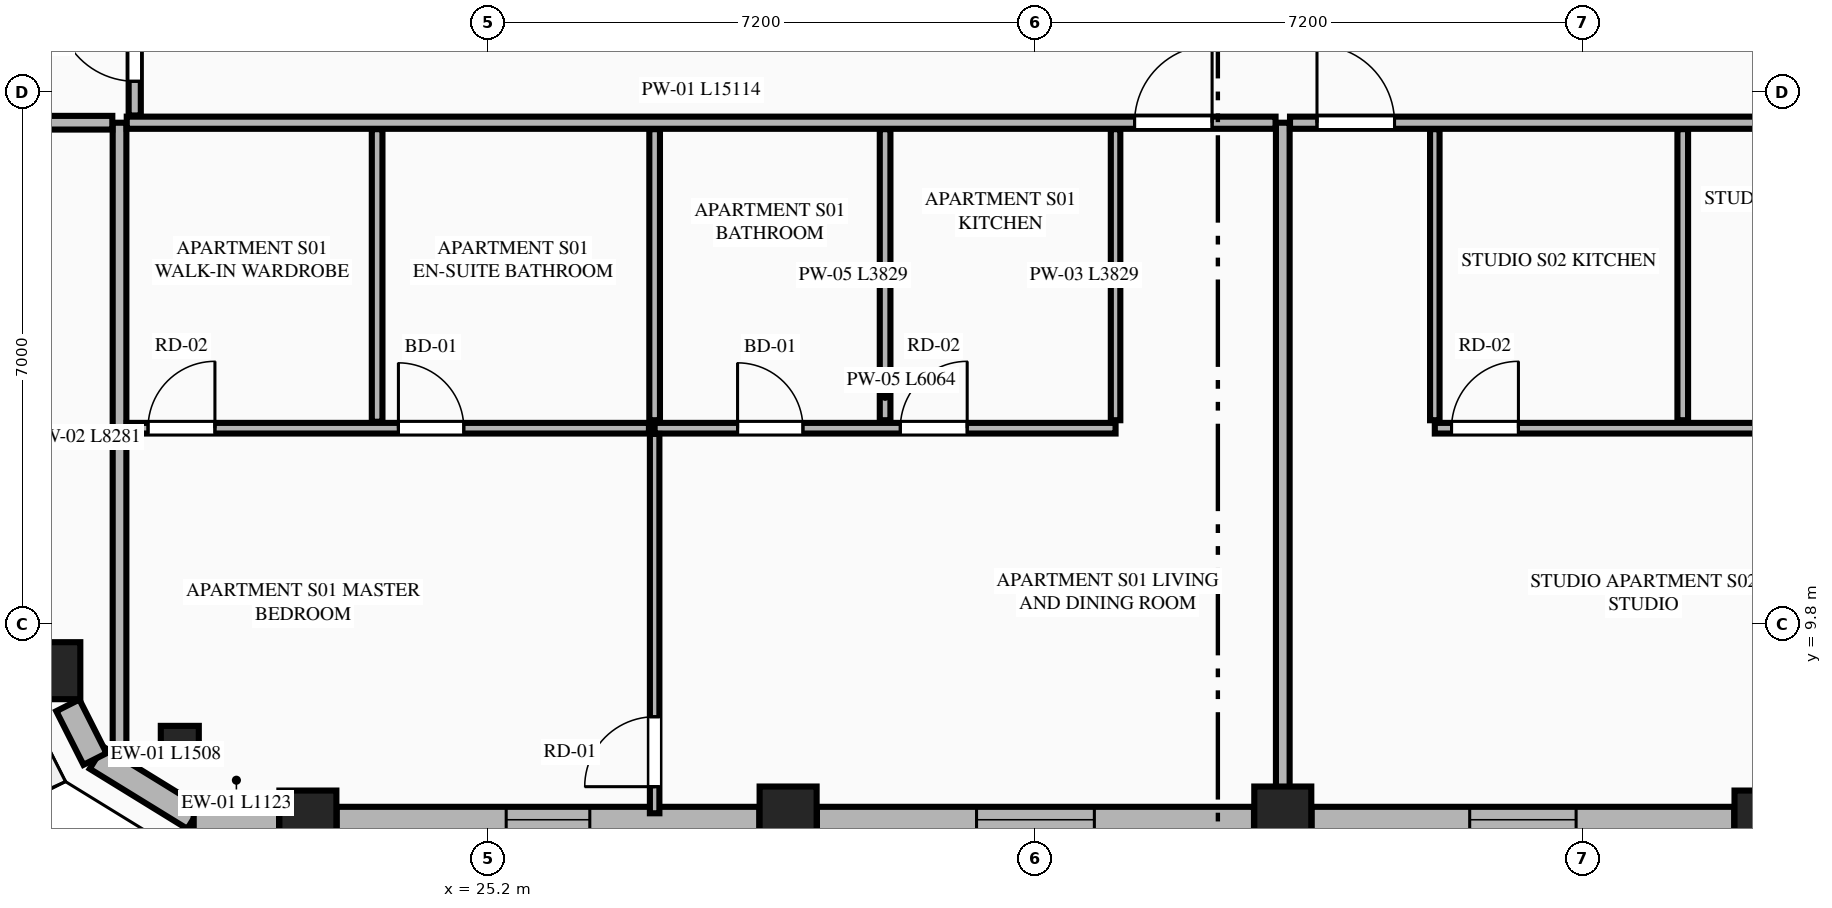
"""IFC4 building model, lengths in metres.
Left out: names, types, materials, properties, quantities, classifications, styles, units other than length and angle.
Written with IfcOpenShell. Run it as: python <this file> out.ifc"""

import sys

from ifc_helpers import new_model, si_unit, direction, frame, frame_2d, origin, origin_2d, place, context, subcontext, project, spatial, rectangle, extrude, element, fill, save


model = new_model("IFC4")
c1 = context("Model", 3, precision=1e-05, world=origin(), true_north=direction((0.0, 1.0)))
c2 = subcontext(c1, "Body", "Model", "MODEL_VIEW")
j1 = project(units=[si_unit("LENGTHUNIT", "METRE"), si_unit("PLANEANGLEUNIT", "RADIAN")], contexts=[c1])
p1 = place(None, origin())
s1 = spatial("IfcSite", under=j1, at=p1, CompositionType="ELEMENT")
p2 = place(p1, origin())
s2 = spatial("IfcBuilding", under=s1, at=p2, CompositionType="ELEMENT")
p3 = place(p2, frame((0.0, 0.0, 256.2)))
s3 = spatial("IfcBuildingStorey", under=s2, at=p3, CompositionType="ELEMENT", Elevation=256.2)
for number, where, z_axis, x_axis in (
    (1, (22.828, 7.239, 0.0), (0.0, 0.0, 1.0), (1.0, 0.0, 0.0)),
    (2, (29.146, 7.292, 0.0), (0.0, 0.0, 1.0), (1.0, 0.0, 0.0)),
    (3, (35.654, 7.292, 0.0), (0.0, 0.0, 1.0), (1.0, 0.0, 0.0)),
    (4, (41.972, 7.239, 0.0), (0.0, 0.0, 1.0), (1.0, 0.0, 0.0)),
    (5, (19.459, 9.191, 0.0), (0.0, 0.0, 1.0), (1.0, 0.0, 0.0)),
):
    element("IfcColumn", number, at=place(p3, frame(where, z_axis=z_axis, x_axis=x_axis)), inside=s3, PredefinedType="COLUMN", context=c2, shape_type="SweptSolid", body=[
        extrude(rectangle(XDim=0.75, YDim=0.75, at=origin_2d()), origin(), (0.0, 0.0, 1.0), 3.65),
    ])
p4 = place(p3, frame((21.143, 8.215, 0.0), z_axis=(0.0, 0.0, 1.0), x_axis=(0.865256437757, -0.501329529272, 0.0)))
e6 = element("IfcColumn", 6, at=p4, inside=s3, PredefinedType="PILASTER", context=c2, shape_type="SweptSolid", body=[
    extrude(rectangle(XDim=0.5, YDim=0.35, at=origin_2d()), origin(), (0.0, 0.0, 1.0), 3.65),
])
p5 = place(p3, frame((20.047, 8.045, 0.0), z_axis=(0.0, 0.0, 1.0), x_axis=(0.851680557619, -0.52406128246, 0.0)))
e7 = element("IfcWall", 7, at=p5, inside=s3, PredefinedType="STANDARD", context=c2, shape_type="SweptSolid", body=[
    extrude(rectangle(XDim=1.508, YDim=0.34, at=frame_2d((0.754, 0.0))), origin(), (0.0, 0.0, 1.0), 3.45),
])
p6 = place(p3, frame((21.326, 7.23, 0.0), z_axis=(0.0, 0.0, 1.0), x_axis=(1.0, 0.0, 0.0)))
e8 = element("IfcWall", 8, at=p6, inside=s3, PredefinedType="STANDARD", context=c2, shape_type="SweptSolid", body=[
    extrude(rectangle(XDim=1.123, YDim=0.34, at=frame_2d((0.562, 0.0))), origin(), (0.0, 0.0, 1.0), 3.45),
])
p7 = place(p3, frame((23.207, 7.23, 0.0), z_axis=(0.0, 0.0, 1.0), x_axis=(1.0, 0.0, 0.0)))
e9 = element("IfcWall", 9, at=p7, inside=s3, PredefinedType="STANDARD", context=c2, shape_type="SweptSolid", body=[
    extrude(rectangle(XDim=5.56, YDim=0.34, at=frame_2d((2.78, 0.0))), origin(), (0.0, 0.0, 1.0), 2.983),
])
p8 = place(p7, frame((2.23, 0.0, 0.75)))
e10 = element("IfcOpeningElement", 10, at=p8, cuts=e9, PredefinedType="OPENING", context=c2, shape_type="SweptSolid", body=[
    extrude(rectangle(XDim=1.1, YDim=2.0, at=frame_2d((0.55, 1.0))), frame((0.0, 0.18, 0.0), z_axis=(0.0, -1.0, 0.0), x_axis=(1.0, 0.0, 0.0)), (0.0, 0.0, 1.0), 0.36),
])
p9 = place(p3, frame((29.525, 7.23, 0.0), z_axis=(0.0, 0.0, 1.0), x_axis=(1.0, 0.0, 0.0)))
e11 = element("IfcWall", 11, at=p9, inside=s3, PredefinedType="STANDARD", context=c2, shape_type="SweptSolid", body=[
    extrude(rectangle(XDim=5.75, YDim=0.34, at=frame_2d((2.875, 0.0))), origin(), (0.0, 0.0, 1.0), 2.983),
])
p10 = place(p9, frame((2.1, 0.0, 0.75)))
e12 = element("IfcOpeningElement", 12, at=p10, cuts=e11, PredefinedType="OPENING", context=c2, shape_type="SweptSolid", body=[
    extrude(rectangle(XDim=1.55, YDim=2.05, at=frame_2d((0.775, 1.025))), frame((0.0, 0.18, 0.0), z_axis=(0.0, -1.0, 0.0), x_axis=(1.0, 0.0, 0.0)), (0.0, 0.0, 1.0), 0.36),
])
p11 = place(p3, frame((36.033, 7.23, 0.0), z_axis=(0.0, 0.0, 1.0), x_axis=(1.0, 0.0, 0.0)))
e13 = element("IfcWall", 13, at=p11, inside=s3, PredefinedType="STANDARD", context=c2, shape_type="SweptSolid", body=[
    extrude(rectangle(XDim=5.56, YDim=0.34, at=frame_2d((2.78, 0.0))), origin(), (0.0, 0.0, 1.0), 2.983),
])
p12 = place(p11, frame((2.08, 0.0, 0.75)))
e14 = element("IfcOpeningElement", 14, at=p12, cuts=e13, PredefinedType="OPENING", context=c2, shape_type="SweptSolid", body=[
    extrude(rectangle(XDim=1.4, YDim=2.05, at=frame_2d((0.7, 1.025))), frame((0.0, 0.18, 0.0), z_axis=(0.0, -1.0, 0.0), x_axis=(1.0, 0.0, 0.0)), (0.0, 0.0, 1.0), 0.36),
])
p13 = place(p3, frame((19.67, 8.735, 0.0), z_axis=(0.0, 0.0, 1.0), x_axis=(0.451404919072, -0.89231922485, 0.0)))
e15 = element("IfcWall", 15, at=p13, inside=s3, PredefinedType="STANDARD", context=c2, shape_type="SweptSolid", body=[
    extrude(rectangle(XDim=0.791, YDim=0.34, at=frame_2d((0.396, 0.0))), origin(), (0.0, 0.0, 1.0), 3.45),
])
p14 = place(p3, frame((20.35, 8.119, 0.0), z_axis=(0.0, 0.0, 1.0), x_axis=(0.0, 1.0, 0.0)))
e16 = element("IfcWall", 16, at=p14, inside=s3, PredefinedType="PARTITIONING", context=c2, shape_type="SweptSolid", body=[
    extrude(rectangle(XDim=8.281, YDim=0.18, at=frame_2d((4.141, 0.0))), origin(), (0.0, 0.0, 1.0), 3.45),
])
p15 = place(p3, frame((35.654, 7.405, 0.0), z_axis=(0.0, 0.0, 1.0), x_axis=(0.0, 1.0, 0.0)))
e17 = element("IfcWall", 17, at=p15, inside=s3, PredefinedType="PARTITIONING", context=c2, shape_type="SweptSolid", body=[
    extrude(rectangle(XDim=8.995, YDim=0.18, at=frame_2d((4.498, 0.0))), origin(), (0.0, 0.0, 1.0), 2.907),
])
p16 = place(p3, frame((20.445, 16.4, 0.0), z_axis=(0.0, 0.0, 1.0), x_axis=(1.0, 0.0, 0.0)))
e18 = element("IfcWall", 18, at=p16, inside=s3, PredefinedType="PARTITIONING", context=c2, shape_type="SweptSolid", body=[
    extrude(rectangle(XDim=15.114, YDim=0.16, at=frame_2d((7.557, 0.0))), origin(), (0.0, 0.0, 1.0), 3.45),
])
p17 = place(p16, frame((13.259, 0.0, 0.0)))
e19 = element("IfcOpeningElement", 19, at=p17, cuts=e18, PredefinedType="OPENING", context=c2, shape_type="SweptSolid", body=[
    extrude(rectangle(XDim=1.02, YDim=2.25, at=frame_2d((0.51, 1.125))), frame((0.0, 0.09, 0.0), z_axis=(0.0, -1.0, 0.0), x_axis=(1.0, 0.0, 0.0)), (0.0, 0.0, 1.0), 0.18),
])
p18 = place(p3, frame((33.454, 12.486, 0.0), z_axis=(0.0, 0.0, 1.0), x_axis=(0.0, 1.0, 0.0)))
e20 = element("IfcWall", 20, at=p18, inside=s3, PredefinedType="PARTITIONING", context=c2, shape_type="SweptSolid", body=[
    extrude(rectangle(XDim=3.829, YDim=0.125, at=frame_2d((1.915, 0.0))), origin(), (0.0, 0.0, 1.0), 3.45),
])
p19 = place(p3, frame((27.39, 12.381, 0.0), z_axis=(0.0, 0.0, 1.0), x_axis=(1.0, 0.0, 0.0)))
e21 = element("IfcWall", 21, at=p19, inside=s3, PredefinedType="PLUMBINGWALL", context=c2, shape_type="SweptSolid", body=[
    extrude(rectangle(XDim=6.064, YDim=0.14, at=frame_2d((3.032, 0.0))), origin(), (0.0, 0.0, 1.0), 3.45),
])
p20 = place(p19, frame((1.091, 0.0, 0.0)))
e22 = element("IfcOpeningElement", 22, at=p20, cuts=e21, PredefinedType="OPENING", context=c2, shape_type="SweptSolid", body=[
    extrude(rectangle(XDim=0.86, YDim=2.1, at=frame_2d((0.43, 1.05))), frame((0.0, 0.08, 0.0), z_axis=(0.0, -1.0, 0.0), x_axis=(1.0, 0.0, 0.0)), (0.0, 0.0, 1.0), 0.16),
])
p21 = place(p19, frame((3.232, 0.0, 0.0)))
e23 = element("IfcOpeningElement", 23, at=p21, cuts=e21, PredefinedType="OPENING", context=c2, shape_type="SweptSolid", body=[
    extrude(rectangle(XDim=0.88, YDim=2.15, at=frame_2d((0.44, 1.075))), frame((0.0, 0.08, 0.0), z_axis=(0.0, -1.0, 0.0), x_axis=(1.0, 0.0, 0.0)), (0.0, 0.0, 1.0), 0.16),
])
p22 = place(p3, frame((20.445, 12.381, 0.0), z_axis=(0.0, 0.0, 1.0), x_axis=(1.0, 0.0, 0.0)))
e24 = element("IfcWall", 24, at=p22, inside=s3, PredefinedType="PLUMBINGWALL", context=c2, shape_type="SweptSolid", body=[
    extrude(rectangle(XDim=6.87, YDim=0.14, at=frame_2d((3.435, 0.0))), origin(), (0.0, 0.0, 1.0), 3.45),
])
p23 = place(p22, frame((0.28, 0.0, 0.0)))
e25 = element("IfcOpeningElement", 25, at=p23, cuts=e24, PredefinedType="OPENING", context=c2, shape_type="SweptSolid", body=[
    extrude(rectangle(XDim=0.88, YDim=2.15, at=frame_2d((0.44, 1.075))), frame((0.0, 0.08, 0.0), z_axis=(0.0, -1.0, 0.0), x_axis=(1.0, 0.0, 0.0)), (0.0, 0.0, 1.0), 0.16),
])
p24 = place(p22, frame((3.574, 0.0, 0.0)))
e26 = element("IfcOpeningElement", 26, at=p24, cuts=e24, PredefinedType="OPENING", context=c2, shape_type="SweptSolid", body=[
    extrude(rectangle(XDim=0.86, YDim=2.1, at=frame_2d((0.43, 1.05))), frame((0.0, 0.08, 0.0), z_axis=(0.0, -1.0, 0.0), x_axis=(1.0, 0.0, 0.0)), (0.0, 0.0, 1.0), 0.16),
])
for number, where, z_axis, x_axis in (
    (27, (30.422, 12.486, 0.0), (0.0, 0.0, 1.0), (0.0, 1.0, 0.0)),
    (28, (27.39, 12.486, 0.0), (0.0, 0.0, 1.0), (0.0, 1.0, 0.0)),
):
    element("IfcWall", number, at=place(p3, frame(where, z_axis=z_axis, x_axis=x_axis)), inside=s3, PredefinedType="PLUMBINGWALL", context=c2, shape_type="SweptSolid", body=[
        extrude(rectangle(XDim=3.829, YDim=0.14, at=frame_2d((1.915, 0.0))), origin(), (0.0, 0.0, 1.0), 3.45),
    ])
p25 = place(p3, frame((27.39, 7.315, 0.0), z_axis=(0.0, 0.0, 1.0), x_axis=(0.0, 1.0, 0.0)))
e29 = element("IfcWall", 29, at=p25, inside=s3, PredefinedType="PARTITIONING", context=c2, shape_type="SweptSolid", body=[
    extrude(rectangle(XDim=4.991, YDim=0.125, at=frame_2d((2.496, 0.0))), origin(), (0.0, 0.0, 1.0), 3.45),
])
p26 = place(p25, frame((0.35, 0.0, 0.0)))
e30 = element("IfcOpeningElement", 30, at=p26, cuts=e29, PredefinedType="OPENING", context=c2, shape_type="SweptSolid", body=[
    extrude(rectangle(XDim=0.92, YDim=2.15, at=frame_2d((0.46, 1.075))), frame((0.0, 0.073, 0.0), z_axis=(0.0, -1.0, 0.0), x_axis=(1.0, 0.0, 0.0)), (0.0, 0.0, 1.0), 0.145),
])
p27 = place(p3, frame((23.739, 12.466, 0.0), z_axis=(0.0, 0.0, 1.0), x_axis=(0.0, 1.0, 0.0)))
e31 = element("IfcWall", 31, at=p27, inside=s3, PredefinedType="PLUMBINGWALL", context=c2, shape_type="SweptSolid", body=[
    extrude(rectangle(XDim=3.849, YDim=0.14, at=frame_2d((1.924, 0.0))), origin(), (0.0, 0.0, 1.0), 3.45),
])
p28 = place(p3, frame((35.749, 16.4, 0.0), z_axis=(0.0, 0.0, 1.0), x_axis=(1.0, 0.0, 0.0)))
e32 = element("IfcWall", 32, at=p28, inside=s3, PredefinedType="PARTITIONING", context=c2, shape_type="SweptSolid", body=[
    extrude(rectangle(XDim=8.606, YDim=0.16, at=frame_2d((4.303, 0.0))), origin(), (0.0, 0.0, 1.0), 3.45),
])
p29 = place(p28, frame((0.355, 0.0, 0.0)))
e33 = element("IfcOpeningElement", 33, at=p29, cuts=e32, PredefinedType="OPENING", context=c2, shape_type="SweptSolid", body=[
    extrude(rectangle(XDim=1.02, YDim=2.25, at=frame_2d((0.51, 1.125))), frame((0.0, 0.09, 0.0), z_axis=(0.0, -1.0, 0.0), x_axis=(1.0, 0.0, 0.0)), (0.0, 0.0, 1.0), 0.18),
])
p30 = place(p3, frame((37.654, 12.486, 0.0), z_axis=(0.0, 0.0, 1.0), x_axis=(0.0, 1.0, 0.0)))
e34 = element("IfcWall", 34, at=p30, inside=s3, PredefinedType="PARTITIONING", context=c2, shape_type="SweptSolid", body=[
    extrude(rectangle(XDim=3.829, YDim=0.125, at=frame_2d((1.915, 0.0))), origin(), (0.0, 0.0, 1.0), 3.45),
])
p31 = place(p3, frame((37.654, 12.381, 0.0), z_axis=(0.0, 0.0, 1.0), x_axis=(1.0, 0.0, 0.0)))
e35 = element("IfcWall", 35, at=p31, inside=s3, PredefinedType="PLUMBINGWALL", context=c2, shape_type="SweptSolid", body=[
    extrude(rectangle(XDim=6.701, YDim=0.14, at=frame_2d((3.351, 0.0))), origin(), (0.0, 0.0, 1.0), 3.45),
])
p32 = place(p31, frame((4.556, 0.0, 0.0)))
e36 = element("IfcOpeningElement", 36, at=p32, cuts=e35, PredefinedType="OPENING", context=c2, shape_type="SweptSolid", body=[
    extrude(rectangle(XDim=0.86, YDim=2.1, at=frame_2d((0.43, 1.05))), frame((0.0, 0.08, 0.0), z_axis=(0.0, -1.0, 0.0), x_axis=(1.0, 0.0, 0.0)), (0.0, 0.0, 1.0), 0.16),
])
p33 = place(p31, frame((0.22, 0.0, 0.0)))
e37 = element("IfcOpeningElement", 37, at=p33, cuts=e35, PredefinedType="OPENING", context=c2, shape_type="SweptSolid", body=[
    extrude(rectangle(XDim=0.88, YDim=2.15, at=frame_2d((0.44, 1.075))), frame((0.0, 0.08, 0.0), z_axis=(0.0, -1.0, 0.0), x_axis=(1.0, 0.0, 0.0)), (0.0, 0.0, 1.0), 0.16),
])
p34 = place(p3, frame((40.916, 12.486, 0.0), z_axis=(0.0, 0.0, 1.0), x_axis=(0.0, 1.0, 0.0)))
e38 = element("IfcWall", 38, at=p34, inside=s3, PredefinedType="PLUMBINGWALL", context=c2, shape_type="SweptSolid", body=[
    extrude(rectangle(XDim=3.829, YDim=0.14, at=frame_2d((1.915, 0.0))), origin(), (0.0, 0.0, 1.0), 3.45),
])
p35 = place(p3, frame((16.034, 16.4, 0.0), z_axis=(0.0, 0.0, 1.0), x_axis=(1.0, 0.0, 0.0)))
e39 = element("IfcWall", 39, at=p35, inside=s3, PredefinedType="PARTITIONING", context=c2, shape_type="SweptSolid", body=[
    extrude(rectangle(XDim=4.221, YDim=0.18, at=frame_2d((2.11, 0.0))), origin(), (0.0, 0.0, 1.0), 3.45),
])
p36 = place(p3, frame((20.55, 16.495, 0.0), z_axis=(0.0, 0.0, 1.0), x_axis=(0.0, 1.0, 0.0)))
e40 = element("IfcWall", 40, at=p36, inside=s3, PredefinedType="PARTITIONING", context=c2, shape_type="SweptSolid", body=[
    extrude(rectangle(XDim=8.366, YDim=0.16, at=frame_2d((4.183, 0.0))), origin(), (0.0, 0.0, 1.0), 3.137),
])
p37 = place(p36, frame((0.45, 0.0, 0.0)))
e41 = element("IfcOpeningElement", 41, at=p37, cuts=e40, PredefinedType="OPENING", context=c2, shape_type="SweptSolid", body=[
    extrude(rectangle(XDim=1.02, YDim=2.25, at=frame_2d((0.51, 1.125))), frame((0.0, 0.09, 0.0), z_axis=(0.0, -1.0, 0.0), x_axis=(1.0, 0.0, 0.0)), (0.0, 0.0, 1.0), 0.18),
])
p38 = place(p8, origin())
e42 = element("IfcWindow", 42, at=p38, inside=s3, PartitioningType="SINGLE_PANEL", PredefinedType="WINDOW", context=c2, shape_type="SweptSolid", body=[
    extrude(rectangle(XDim=1.1, YDim=2.0, at=frame_2d((0.55, 1.0))), frame((0.0, 0.03, 0.0), z_axis=(0.0, -1.0, 0.0), x_axis=(1.0, 0.0, 0.0)), (0.0, 0.0, 1.0), 0.06),
])
fill(e10, e42)
p39 = place(p10, origin())
e43 = element("IfcWindow", 43, at=p39, inside=s3, PartitioningType="SINGLE_PANEL", PredefinedType="WINDOW", context=c2, shape_type="SweptSolid", body=[
    extrude(rectangle(XDim=1.55, YDim=2.05, at=frame_2d((0.775, 1.025))), frame((0.0, 0.03, 0.0), z_axis=(0.0, -1.0, 0.0), x_axis=(1.0, 0.0, 0.0)), (0.0, 0.0, 1.0), 0.06),
])
fill(e12, e43)
p40 = place(p12, origin())
e44 = element("IfcWindow", 44, at=p40, inside=s3, PartitioningType="SINGLE_PANEL", PredefinedType="WINDOW", context=c2, shape_type="SweptSolid", body=[
    extrude(rectangle(XDim=1.4, YDim=2.05, at=frame_2d((0.7, 1.025))), frame((0.0, 0.03, 0.0), z_axis=(0.0, -1.0, 0.0), x_axis=(1.0, 0.0, 0.0)), (0.0, 0.0, 1.0), 0.06),
])
fill(e14, e44)
p41 = place(p20, origin())
e45 = element("IfcDoor", 45, at=p41, inside=s3, OperationType="SINGLE_SWING_LEFT", PredefinedType="DOOR", context=c2, shape_type="SweptSolid", body=[
    extrude(rectangle(XDim=0.86, YDim=2.1, at=frame_2d((0.43, 1.05))), frame((0.0, 0.025, 0.0), z_axis=(0.0, -1.0, 0.0), x_axis=(1.0, 0.0, 0.0)), (0.0, 0.0, 1.0), 0.05),
])
fill(e22, e45)
p42 = place(p23, origin())
e46 = element("IfcDoor", 46, at=p42, inside=s3, OperationType="SINGLE_SWING_RIGHT", PredefinedType="DOOR", context=c2, shape_type="SweptSolid", body=[
    extrude(rectangle(XDim=0.88, YDim=2.15, at=frame_2d((0.44, 1.075))), frame((0.0, 0.025, 0.0), z_axis=(0.0, -1.0, 0.0), x_axis=(1.0, 0.0, 0.0)), (0.0, 0.0, 1.0), 0.05),
])
fill(e25, e46)
p43 = place(p24, origin())
e47 = element("IfcDoor", 47, at=p43, inside=s3, OperationType="SINGLE_SWING_LEFT", PredefinedType="DOOR", context=c2, shape_type="SweptSolid", body=[
    extrude(rectangle(XDim=0.86, YDim=2.1, at=frame_2d((0.43, 1.05))), frame((0.0, 0.025, 0.0), z_axis=(0.0, -1.0, 0.0), x_axis=(1.0, 0.0, 0.0)), (0.0, 0.0, 1.0), 0.05),
])
fill(e26, e47)
p44 = place(p17, origin())
e48 = element("IfcDoor", 48, at=p44, inside=s3, OperationType="SINGLE_SWING_RIGHT", PredefinedType="DOOR", context=c2, shape_type="SweptSolid", body=[
    extrude(rectangle(XDim=1.02, YDim=2.25, at=frame_2d((0.51, 1.125))), frame((0.0, 0.025, 0.0), z_axis=(0.0, -1.0, 0.0), x_axis=(1.0, 0.0, 0.0)), (0.0, 0.0, 1.0), 0.05),
])
fill(e19, e48)
p45 = place(p21, origin())
e49 = element("IfcDoor", 49, at=p45, inside=s3, OperationType="SINGLE_SWING_RIGHT", PredefinedType="DOOR", context=c2, shape_type="SweptSolid", body=[
    extrude(rectangle(XDim=0.88, YDim=2.15, at=frame_2d((0.44, 1.075))), frame((0.0, 0.025, 0.0), z_axis=(0.0, -1.0, 0.0), x_axis=(1.0, 0.0, 0.0)), (0.0, 0.0, 1.0), 0.05),
])
fill(e23, e49)
p46 = place(p26, origin())
e50 = element("IfcDoor", 50, at=p46, inside=s3, OperationType="SINGLE_SWING_LEFT", PredefinedType="DOOR", context=c2, shape_type="SweptSolid", body=[
    extrude(rectangle(XDim=0.92, YDim=2.15, at=frame_2d((0.46, 1.075))), frame((0.0, 0.025, 0.0), z_axis=(0.0, -1.0, 0.0), x_axis=(1.0, 0.0, 0.0)), (0.0, 0.0, 1.0), 0.05),
])
fill(e30, e50)
p47 = place(p29, origin())
e51 = element("IfcDoor", 51, at=p47, inside=s3, OperationType="SINGLE_SWING_LEFT", PredefinedType="DOOR", context=c2, shape_type="SweptSolid", body=[
    extrude(rectangle(XDim=1.02, YDim=2.25, at=frame_2d((0.51, 1.125))), frame((0.0, 0.025, 0.0), z_axis=(0.0, -1.0, 0.0), x_axis=(1.0, 0.0, 0.0)), (0.0, 0.0, 1.0), 0.05),
])
fill(e33, e51)
p48 = place(p33, origin())
e52 = element("IfcDoor", 52, at=p48, inside=s3, OperationType="SINGLE_SWING_RIGHT", PredefinedType="DOOR", context=c2, shape_type="SweptSolid", body=[
    extrude(rectangle(XDim=0.88, YDim=2.15, at=frame_2d((0.44, 1.075))), frame((0.0, 0.025, 0.0), z_axis=(0.0, -1.0, 0.0), x_axis=(1.0, 0.0, 0.0)), (0.0, 0.0, 1.0), 0.05),
])
fill(e37, e52)
p49 = place(p37, origin())
e53 = element("IfcDoor", 53, at=p49, inside=s3, OperationType="SINGLE_SWING_RIGHT", PredefinedType="DOOR", context=c2, shape_type="SweptSolid", body=[
    extrude(rectangle(XDim=1.02, YDim=2.25, at=frame_2d((0.51, 1.125))), frame((0.0, 0.025, 0.0), z_axis=(0.0, -1.0, 0.0), x_axis=(1.0, 0.0, 0.0)), (0.0, 0.0, 1.0), 0.05),
])
fill(e41, e53)
save(model, sys.argv[1])
